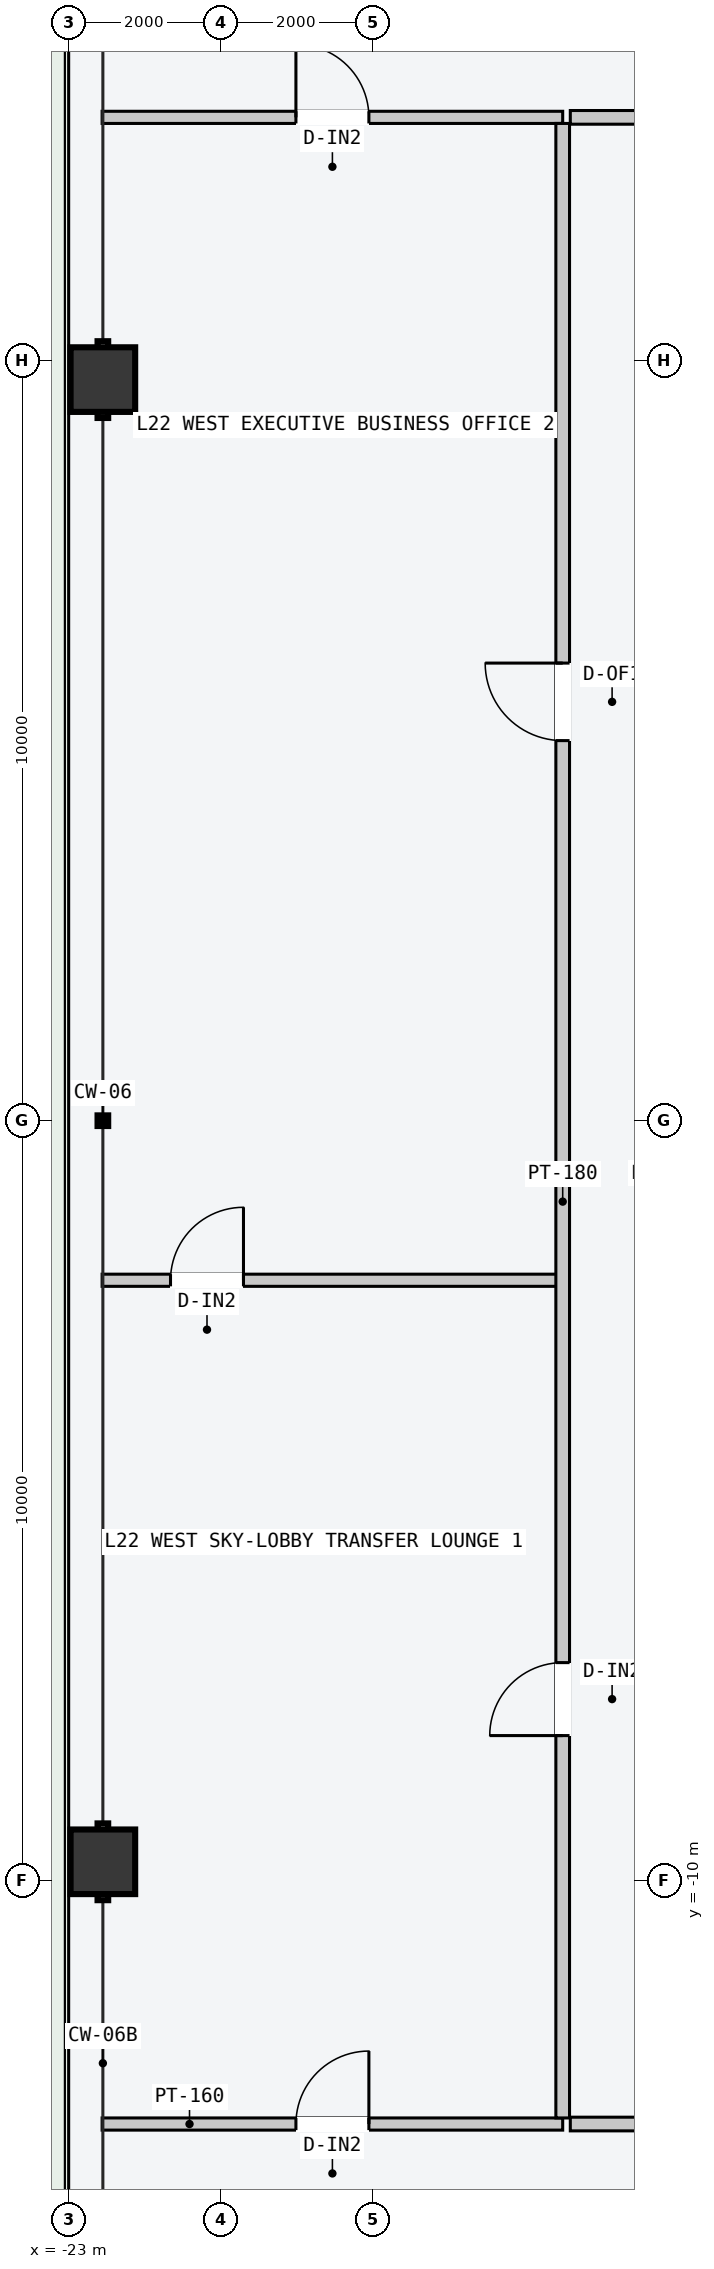
"""IFC4 building model, lengths in metres.
Left out: names, types, materials, properties, quantities, classifications, styles, units other than length and angle.
Written with IfcOpenShell. Run it as: python <this file> out.ifc"""

import sys

from ifc_helpers import new_model, si_unit, direction, frame, frame_2d, origin, origin_2d, place, context, subcontext, project, spatial, rectangle, hollow_rectangle, extrude, element, fill, save


model = new_model("IFC4")
c1 = context("Model", 3, precision=1e-05, world=origin(), true_north=direction((0.0, 1.0)))
c2 = subcontext(c1, "Body", "Model", "MODEL_VIEW")
j1 = project(units=[si_unit("LENGTHUNIT", "METRE"), si_unit("PLANEANGLEUNIT", "RADIAN")], contexts=[c1])
p1 = place(None, origin())
s1 = spatial("IfcSite", under=j1, at=p1, CompositionType="ELEMENT")
p2 = place(p1, origin())
s2 = spatial("IfcBuilding", under=s1, at=p2, CompositionType="ELEMENT")
p3 = place(p2, frame((0.0, 0.0, 87.3)))
s3 = spatial("IfcBuildingStorey", under=s2, at=p3, CompositionType="ELEMENT", Elevation=87.3)
for number, where, z_axis, x_axis in (
    (1, (-22.55, -9.75, -0.2), (0.0, 0.0, 1.0), (0.0, 1.0, 0.0)),
    (2, (-22.55, 9.75, -0.2), (0.0, 0.0, 1.0), (0.0, 1.0, 0.0)),
):
    element("IfcColumn", number, at=place(p3, frame(where, z_axis=z_axis, x_axis=x_axis)), inside=s3, PredefinedType="COLUMN", context=c2, shape_type="SweptSolid", body=[
        extrude(hollow_rectangle(XDim=0.85, YDim=0.85, WallThickness=0.04, at=origin_2d()), origin(), (0.0, 0.0, 1.0), 4.7),
    ])
p4 = place(p3, frame((-16.4, 13.2, 0.0), z_axis=(0.0, 0.0, 1.0), x_axis=(1.0, 0.0, 0.0)))
e3 = element("IfcWall", 3, at=p4, inside=s3, PredefinedType="PARTITIONING", context=c2, shape_type="SweptSolid", body=[
    extrude(rectangle(XDim=32.8, YDim=0.18, at=frame_2d((16.4, 0.0))), origin(), (0.0, 0.0, 1.0), 4.3),
])
p5 = place(p4, frame((5.044, 0.0, 0.0)))
e4 = element("IfcOpeningElement", 4, at=p5, cuts=e3, PredefinedType="OPENING", context=c2, shape_type="SweptSolid", body=[
    extrude(rectangle(XDim=0.9, YDim=2.15, at=frame_2d((0.45, 1.075))), frame((0.0, 0.1, 0.0), z_axis=(0.0, -1.0, 0.0), x_axis=(1.0, 0.0, 0.0)), (0.0, 0.0, 1.0), 0.2),
])
p6 = place(p4, frame((21.414, 0.0, 0.0)))
e5 = element("IfcOpeningElement", 5, at=p6, cuts=e3, PredefinedType="OPENING", context=c2, shape_type="SweptSolid", body=[
    extrude(rectangle(XDim=0.96, YDim=2.18, at=frame_2d((0.48, 1.09))), frame((0.0, 0.1, 0.0), z_axis=(0.0, -1.0, 0.0), x_axis=(1.0, 0.0, 0.0)), (0.0, 0.0, 1.0), 0.2),
])
p7 = place(p3, frame((-22.56, 13.2, 0.0), z_axis=(0.0, 0.0, 1.0), x_axis=(1.0, 0.0, 0.0)))
e6 = element("IfcWall", 6, at=p7, inside=s3, PredefinedType="PARTITIONING", context=c2, shape_type="SweptSolid", body=[
    extrude(rectangle(XDim=6.06, YDim=0.16, at=frame_2d((3.03, 0.0))), origin(), (0.0, 0.0, 1.0), 4.3),
])
p8 = place(p7, frame((2.55, 0.0, 0.0)))
e7 = element("IfcOpeningElement", 7, at=p8, cuts=e6, PredefinedType="OPENING", context=c2, shape_type="SweptSolid", body=[
    extrude(rectangle(XDim=0.96, YDim=2.18, at=frame_2d((0.48, 1.09))), frame((0.0, 0.09, 0.0), z_axis=(0.0, -1.0, 0.0), x_axis=(1.0, 0.0, 0.0)), (0.0, 0.0, 1.0), 0.18),
])
p9 = place(p3, frame((-16.4, -13.2, 0.0), z_axis=(0.0, 0.0, 1.0), x_axis=(1.0, 0.0, 0.0)))
e8 = element("IfcWall", 8, at=p9, inside=s3, PredefinedType="PARTITIONING", context=c2, shape_type="SweptSolid", body=[
    extrude(rectangle(XDim=32.8, YDim=0.18, at=frame_2d((16.4, 0.0))), origin(), (0.0, 0.0, 1.0), 4.3),
])
p10 = place(p9, frame((10.037, 0.0, 0.0)))
e9 = element("IfcOpeningElement", 9, at=p10, cuts=e8, PredefinedType="OPENING", context=c2, shape_type="SweptSolid", body=[
    extrude(rectangle(XDim=1.06, YDim=2.2, at=frame_2d((0.53, 1.1))), frame((0.0, 0.1, 0.0), z_axis=(0.0, -1.0, 0.0), x_axis=(1.0, 0.0, 0.0)), (0.0, 0.0, 1.0), 0.2),
])
p11 = place(p9, frame((26.347, 0.0, 0.0)))
e10 = element("IfcOpeningElement", 10, at=p11, cuts=e8, PredefinedType="OPENING", context=c2, shape_type="SweptSolid", body=[
    extrude(rectangle(XDim=1.24, YDim=2.24, at=frame_2d((0.62, 1.12))), frame((0.0, 0.1, 0.0), z_axis=(0.0, -1.0, 0.0), x_axis=(1.0, 0.0, 0.0)), (0.0, 0.0, 1.0), 0.2),
])
p12 = place(p3, frame((-22.56, -13.2, 0.0), z_axis=(0.0, 0.0, 1.0), x_axis=(1.0, 0.0, 0.0)))
e11 = element("IfcWall", 11, at=p12, inside=s3, PredefinedType="PARTITIONING", context=c2, shape_type="SweptSolid", body=[
    extrude(rectangle(XDim=6.06, YDim=0.16, at=frame_2d((3.03, 0.0))), origin(), (0.0, 0.0, 1.0), 4.3),
])
p13 = place(p12, frame((2.55, 0.0, 0.0)))
e12 = element("IfcOpeningElement", 12, at=p13, cuts=e11, PredefinedType="OPENING", context=c2, shape_type="SweptSolid", body=[
    extrude(rectangle(XDim=0.96, YDim=2.18, at=frame_2d((0.48, 1.09))), frame((0.0, 0.09, 0.0), z_axis=(0.0, -1.0, 0.0), x_axis=(1.0, 0.0, 0.0)), (0.0, 0.0, 1.0), 0.18),
])
p14 = place(p3, frame((-22.56, -2.099, 0.0), z_axis=(0.0, 0.0, 1.0), x_axis=(1.0, 0.0, 0.0)))
e13 = element("IfcWall", 13, at=p14, inside=s3, PredefinedType="PARTITIONING", context=c2, shape_type="SweptSolid", body=[
    extrude(rectangle(XDim=6.0, YDim=0.16, at=frame_2d((3.0, 0.0))), origin(), (0.0, 0.0, 1.0), 4.3),
])
p15 = place(p14, frame((0.9, 0.0, 0.0)))
e14 = element("IfcOpeningElement", 14, at=p15, cuts=e13, PredefinedType="OPENING", context=c2, shape_type="SweptSolid", body=[
    extrude(rectangle(XDim=0.96, YDim=2.18, at=frame_2d((0.48, 1.09))), frame((0.0, 0.09, 0.0), z_axis=(0.0, -1.0, 0.0), x_axis=(1.0, 0.0, 0.0)), (0.0, 0.0, 1.0), 0.18),
])
p16 = place(p3, frame((-16.5, -13.12, 0.0), z_axis=(0.0, 0.0, 1.0), x_axis=(0.0, 1.0, 0.0)))
e15 = element("IfcWall", 15, at=p16, inside=s3, PredefinedType="PARTITIONING", context=c2, shape_type="SweptSolid", body=[
    extrude(rectangle(XDim=26.24, YDim=0.18, at=frame_2d((13.12, 0.0))), origin(), (0.0, 0.0, 1.0), 4.3),
])
p17 = place(p16, frame((5.031, 0.0, 0.0)))
e16 = element("IfcOpeningElement", 16, at=p17, cuts=e15, PredefinedType="OPENING", context=c2, shape_type="SweptSolid", body=[
    extrude(rectangle(XDim=0.96, YDim=2.18, at=frame_2d((0.48, 1.09))), frame((0.0, 0.1, 0.0), z_axis=(0.0, -1.0, 0.0), x_axis=(1.0, 0.0, 0.0)), (0.0, 0.0, 1.0), 0.2),
])
p18 = place(p16, frame((18.12, 0.0, 0.0)))
e17 = element("IfcOpeningElement", 17, at=p18, cuts=e15, PredefinedType="OPENING", context=c2, shape_type="SweptSolid", body=[
    extrude(rectangle(XDim=1.02, YDim=2.2, at=frame_2d((0.51, 1.1))), frame((0.0, 0.1, 0.0), z_axis=(0.0, -1.0, 0.0), x_axis=(1.0, 0.0, 0.0)), (0.0, 0.0, 1.0), 0.2),
])
p19 = place(p8, origin())
e18 = element("IfcDoor", 18, at=p19, inside=s3, OperationType="SINGLE_SWING_LEFT", PredefinedType="DOOR", context=c2, shape_type="SweptSolid", body=[
    extrude(rectangle(XDim=0.96, YDim=2.18, at=frame_2d((0.48, 1.09))), frame((0.0, 0.025, 0.0), z_axis=(0.0, -1.0, 0.0), x_axis=(1.0, 0.0, 0.0)), (0.0, 0.0, 1.0), 0.05),
])
fill(e7, e18)
p20 = place(p13, origin())
e19 = element("IfcDoor", 19, at=p20, inside=s3, OperationType="SINGLE_SWING_RIGHT", PredefinedType="DOOR", context=c2, shape_type="SweptSolid", body=[
    extrude(rectangle(XDim=0.96, YDim=2.18, at=frame_2d((0.48, 1.09))), frame((0.0, 0.025, 0.0), z_axis=(0.0, -1.0, 0.0), x_axis=(1.0, 0.0, 0.0)), (0.0, 0.0, 1.0), 0.05),
])
fill(e12, e19)
p21 = place(p15, origin())
e20 = element("IfcDoor", 20, at=p21, inside=s3, OperationType="SINGLE_SWING_RIGHT", PredefinedType="DOOR", context=c2, shape_type="SweptSolid", body=[
    extrude(rectangle(XDim=0.96, YDim=2.18, at=frame_2d((0.48, 1.09))), frame((0.0, 0.025, 0.0), z_axis=(0.0, -1.0, 0.0), x_axis=(1.0, 0.0, 0.0)), (0.0, 0.0, 1.0), 0.05),
])
fill(e14, e20)
p22 = place(p17, origin())
e21 = element("IfcDoor", 21, at=p22, inside=s3, OperationType="SINGLE_SWING_LEFT", PredefinedType="DOOR", context=c2, shape_type="SweptSolid", body=[
    extrude(rectangle(XDim=0.96, YDim=2.18, at=frame_2d((0.48, 1.09))), frame((0.0, 0.025, 0.0), z_axis=(0.0, -1.0, 0.0), x_axis=(1.0, 0.0, 0.0)), (0.0, 0.0, 1.0), 0.05),
])
fill(e16, e21)
p23 = place(p18, origin())
e22 = element("IfcDoor", 22, at=p23, inside=s3, OperationType="SINGLE_SWING_RIGHT", PredefinedType="DOOR", context=c2, shape_type="SweptSolid", body=[
    extrude(rectangle(XDim=1.02, YDim=2.2, at=frame_2d((0.51, 1.1))), frame((0.0, 0.025, 0.0), z_axis=(0.0, -1.0, 0.0), x_axis=(1.0, 0.0, 0.0)), (0.0, 0.0, 1.0), 0.05),
])
fill(e17, e22)
save(model, sys.argv[1])
